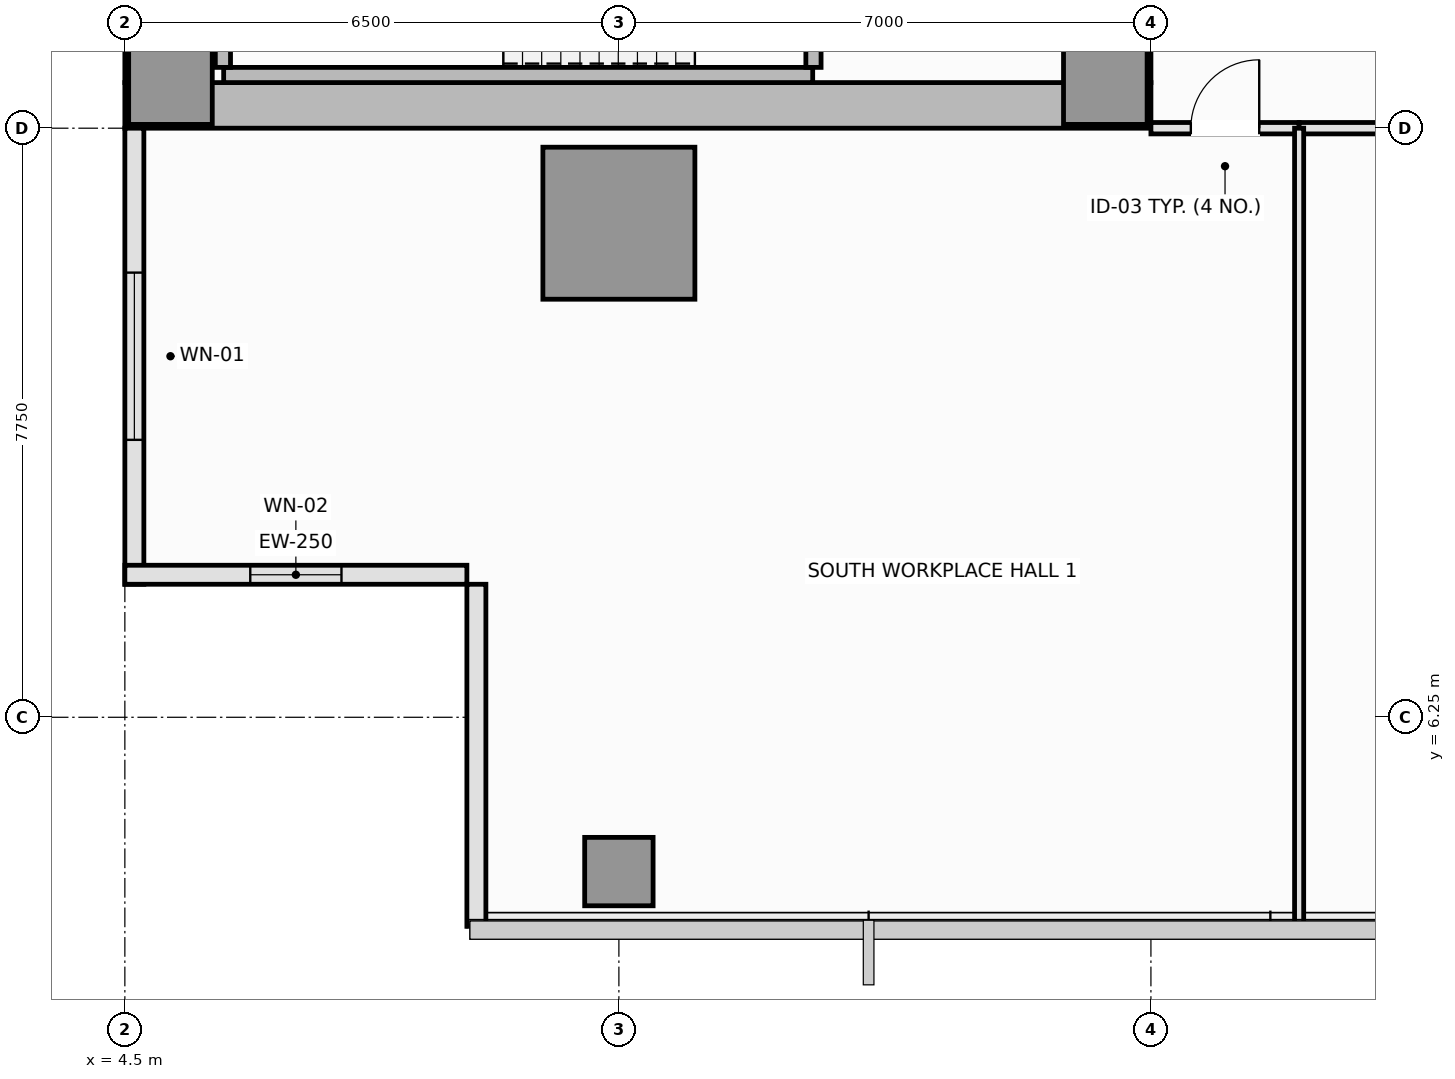
"""IFC4 building model, lengths in metres.
Left out: names, types, materials, properties, quantities, classifications, styles, units other than length and angle.
Written with IfcOpenShell. Run it as: python <this file> out.ifc"""

import sys

from ifc_helpers import new_model, si_unit, direction, frame, frame_2d, origin, origin_2d, place, context, subcontext, project, spatial, rectangle, extrude, element, fill, save


model = new_model("IFC4")
c1 = context("Model", 3, precision=1e-05, world=origin(), true_north=direction((0.0, 1.0)))
c2 = subcontext(c1, "Body", "Model", "MODEL_VIEW")
j1 = project(units=[si_unit("LENGTHUNIT", "METRE"), si_unit("PLANEANGLEUNIT", "RADIAN")], contexts=[c1])
p1 = place(None, origin())
s1 = spatial("IfcSite", under=j1, at=p1, CompositionType="ELEMENT")
p2 = place(p1, origin())
s2 = spatial("IfcBuilding", under=s1, at=p2, CompositionType="ELEMENT")
p3 = place(p2, frame((0.0, 0.0, 148.4)))
s3 = spatial("IfcBuildingStorey", under=s2, at=p3, CompositionType="ELEMENT", Elevation=148.4)
p4 = place(p3, frame((4.5, 14.3, 0.0), z_axis=(0.0, 0.0, 1.0), x_axis=(1.0, 0.0, 0.0)))
e1 = element("IfcWall", 1, at=p4, inside=s3, PredefinedType="SHEAR", context=c2, shape_type="SweptSolid", body=[
    extrude(rectangle(XDim=13.5, YDim=0.6, at=frame_2d((6.75, 0.0))), origin(), (0.0, 0.0, 1.0), 3.55),
])
p5 = place(p3, frame((4.8, 14.6, 0.0), z_axis=(0.0, 0.0, 1.0), x_axis=(0.0, 1.0, 0.0)))
e2 = element("IfcWall", 2, at=p5, inside=s3, PredefinedType="SHEAR", context=c2, shape_type="SweptSolid", body=[
    extrude(rectangle(XDim=21.3, YDim=0.6, at=frame_2d((10.65, 0.0))), origin(), (0.0, 0.0, 1.0), 3.55),
])
p6 = place(p3, frame((17.7, 14.6, 0.0), z_axis=(0.0, 0.0, 1.0), x_axis=(0.0, 1.0, 0.0)))
e3 = element("IfcWall", 3, at=p6, inside=s3, PredefinedType="SHEAR", context=c2, shape_type="SweptSolid", body=[
    extrude(rectangle(XDim=8.85, YDim=0.6, at=frame_2d((4.425, 0.0))), origin(), (0.0, 0.0, 1.0), 3.55),
])
p7 = place(p6, frame((4.3, 0.0, 0.0)))
e4 = element("IfcOpeningElement", 4, at=p7, cuts=e3, PredefinedType="OPENING", context=c2, shape_type="SweptSolid", body=[
    extrude(rectangle(XDim=1.1, YDim=2.15, at=frame_2d((0.55, 1.075))), frame((0.0, 0.31, 0.0), z_axis=(0.0, -1.0, 0.0), x_axis=(1.0, 0.0, 0.0)), (0.0, 0.0, 1.0), 0.62),
])
for number, where, z_axis, x_axis in (
    (5, (5.1, 14.6, 0.0), (0.0, 0.0, 1.0), (1.0, 0.0, 0.0)),
    (6, (17.4, 14.6, 0.0), (0.0, 0.0, 1.0), (1.0, 0.0, 0.0)),
):
    element("IfcColumn", number, at=place(p3, frame(where, z_axis=z_axis, x_axis=x_axis)), inside=s3, PredefinedType="PILASTER", context=c2, shape_type="SweptSolid", body=[
        extrude(rectangle(XDim=1.1, YDim=1.1, at=origin_2d()), origin(), (0.0, 0.0, 1.0), 3.55),
    ])
p8 = place(p3, frame((11.0, 12.75, 0.0), z_axis=(0.0, 0.0, 1.0), x_axis=(1.0, 0.0, 0.0)))
e7 = element("IfcColumn", 7, at=p8, inside=s3, PredefinedType="COLUMN", context=c2, shape_type="SweptSolid", body=[
    extrude(rectangle(XDim=2.0, YDim=2.0, at=origin_2d()), origin(), (0.0, 0.0, 1.0), 3.55),
])
p9 = place(p3, frame((11.0, 4.22, 0.0), z_axis=(0.0, 0.0, 1.0), x_axis=(1.0, 0.0, 0.0)))
e8 = element("IfcColumn", 8, at=p9, inside=s3, PredefinedType="COLUMN", context=c2, shape_type="SweptSolid", body=[
    extrude(rectangle(XDim=0.9, YDim=0.9, at=origin_2d()), origin(), (0.0, 0.0, 1.0), 3.55),
])
p10 = place(p3, frame((4.625, 14.0, 0.0), z_axis=(0.0, 0.0, 1.0), x_axis=(0.0, -1.0, 0.0)))
e9 = element("IfcWall", 9, at=p10, inside=s3, PredefinedType="SOLIDWALL", context=c2, shape_type="SweptSolid", body=[
    extrude(rectangle(XDim=6.0, YDim=0.25, at=frame_2d((3.0, 0.0))), origin(), (0.0, 0.0, 1.0), 3.37),
])
p11 = place(p10, frame((1.9, 0.0, 0.9)))
e10 = element("IfcOpeningElement", 10, at=p11, cuts=e9, PredefinedType="OPENING", context=c2, shape_type="SweptSolid", body=[
    extrude(rectangle(XDim=2.2, YDim=1.8, at=frame_2d((1.1, 0.9))), frame((0.0, 0.135, 0.0), z_axis=(0.0, -1.0, 0.0), x_axis=(1.0, 0.0, 0.0)), (0.0, 0.0, 1.0), 0.27),
])
p12 = place(p3, frame((4.5, 8.125, 0.0), z_axis=(0.0, 0.0, 1.0), x_axis=(1.0, 0.0, 0.0)))
e11 = element("IfcWall", 11, at=p12, inside=s3, PredefinedType="SOLIDWALL", context=c2, shape_type="SweptSolid", body=[
    extrude(rectangle(XDim=4.5, YDim=0.25, at=frame_2d((2.25, 0.0))), origin(), (0.0, 0.0, 1.0), 3.37),
])
p13 = place(p12, frame((1.65, 0.0, 0.9)))
e12 = element("IfcOpeningElement", 12, at=p13, cuts=e11, PredefinedType="OPENING", context=c2, shape_type="SweptSolid", body=[
    extrude(rectangle(XDim=1.2, YDim=1.8, at=frame_2d((0.6, 0.9))), frame((0.0, 0.135, 0.0), z_axis=(0.0, -1.0, 0.0), x_axis=(1.0, 0.0, 0.0)), (0.0, 0.0, 1.0), 0.27),
])
p14 = place(p3, frame((9.125, 8.0, 0.0), z_axis=(0.0, 0.0, 1.0), x_axis=(0.0, -1.0, 0.0)))
e13 = element("IfcWall", 13, at=p14, inside=s3, PredefinedType="SOLIDWALL", context=c2, shape_type="SweptSolid", body=[
    extrude(rectangle(XDim=4.5, YDim=0.25, at=frame_2d((2.25, 0.0))), origin(), (0.0, 0.0, 1.0), 3.37),
])
p15 = place(p3, frame((5.8, 14.7, 0.0), z_axis=(0.0, 0.0, 1.0), x_axis=(1.0, 0.0, 0.0)))
e14 = element("IfcWall", 14, at=p15, inside=s3, PredefinedType="SOLIDWALL", context=c2, shape_type="SweptSolid", body=[
    extrude(rectangle(XDim=7.75, YDim=0.2, at=frame_2d((3.875, 0.0))), origin(), (0.0, 0.0, 1.0), 3.55),
])
p16 = place(p3, frame((5.79, 14.8, 0.0), z_axis=(0.0, 0.0, 1.0), x_axis=(0.0, 1.0, 0.0)))
e15 = element("IfcWall", 15, at=p16, inside=s3, PredefinedType="SOLIDWALL", context=c2, shape_type="SweptSolid", body=[
    extrude(rectangle(XDim=3.05, YDim=0.2, at=frame_2d((1.525, 0.0))), origin(), (0.0, 0.0, 1.0), 3.55),
])
p17 = place(p3, frame((13.56, 14.8, 0.0), z_axis=(0.0, 0.0, 1.0), x_axis=(0.0, 1.0, 0.0)))
e16 = element("IfcWall", 16, at=p17, inside=s3, PredefinedType="SOLIDWALL", context=c2, shape_type="SweptSolid", body=[
    extrude(rectangle(XDim=3.05, YDim=0.2, at=frame_2d((1.525, 0.0))), origin(), (0.0, 0.0, 1.0), 3.55),
])
p18 = place(p17, frame((0.95, 0.0, 0.0)))
e17 = element("IfcOpeningElement", 17, at=p18, cuts=e16, PredefinedType="OPENING", context=c2, shape_type="SweptSolid", body=[
    extrude(rectangle(XDim=1.15, YDim=2.15, at=frame_2d((0.575, 1.075))), frame((0.0, 0.11, 0.0), z_axis=(0.0, -1.0, 0.0), x_axis=(1.0, 0.0, 0.0)), (0.0, 0.0, 1.0), 0.22),
])
p19 = place(p3, frame((18.0, 14.0, 0.0), z_axis=(0.0, 0.0, 1.0), x_axis=(1.0, 0.0, 0.0)))
e18 = element("IfcWall", 18, at=p19, inside=s3, PredefinedType="PARTITIONING", context=c2, shape_type="SweptSolid", body=[
    extrude(rectangle(XDim=1.95, YDim=0.15, at=frame_2d((0.975, 0.0))), origin(), (0.0, 0.0, 1.0), 3.37),
])
p20 = place(p19, frame((0.525, 0.0, 0.0)))
e19 = element("IfcOpeningElement", 19, at=p20, cuts=e18, PredefinedType="OPENING", context=c2, shape_type="SweptSolid", body=[
    extrude(rectangle(XDim=0.9, YDim=2.1, at=frame_2d((0.45, 1.05))), frame((0.0, 0.085, 0.0), z_axis=(0.0, -1.0, 0.0), x_axis=(1.0, 0.0, 0.0)), (0.0, 0.0, 1.0), 0.17),
])
p21 = place(p3, frame((19.95, 14.0, 0.0), z_axis=(0.0, 0.0, 1.0), x_axis=(1.0, 0.0, 0.0)))
e20 = element("IfcWall", 20, at=p21, inside=s3, PredefinedType="PARTITIONING", context=c2, shape_type="SweptSolid", body=[
    extrude(rectangle(XDim=7.55, YDim=0.15, at=frame_2d((3.775, 0.0))), origin(), (0.0, 0.0, 1.0), 3.37),
])
p22 = place(p21, frame((3.275, 0.0, 0.0)))
e21 = element("IfcOpeningElement", 21, at=p22, cuts=e20, PredefinedType="OPENING", context=c2, shape_type="SweptSolid", body=[
    extrude(rectangle(XDim=1.0, YDim=2.15, at=frame_2d((0.5, 1.075))), frame((0.0, 0.085, 0.0), z_axis=(0.0, -1.0, 0.0), x_axis=(1.0, 0.0, 0.0)), (0.0, 0.0, 1.0), 0.17),
])
p23 = place(p3, frame((19.95, 3.51, 0.0), z_axis=(0.0, 0.0, 1.0), x_axis=(0.0, 1.0, 0.0)))
e22 = element("IfcWall", 22, at=p23, inside=s3, PredefinedType="PARTITIONING", context=c2, shape_type="SweptSolid", body=[
    extrude(rectangle(XDim=10.49, YDim=0.12, at=frame_2d((5.245, 0.0))), origin(), (0.0, 0.0, 1.0), 3.37),
])
p24 = place(p11, origin())
e23 = element("IfcWindow", 23, at=p24, inside=s3, PartitioningType="SINGLE_PANEL", PredefinedType="WINDOW", context=c2, shape_type="SweptSolid", body=[
    extrude(rectangle(XDim=2.2, YDim=1.8, at=frame_2d((1.1, 0.9))), frame((0.0, 0.03, 0.0), z_axis=(0.0, -1.0, 0.0), x_axis=(1.0, 0.0, 0.0)), (0.0, 0.0, 1.0), 0.06),
])
fill(e10, e23)
p25 = place(p13, origin())
e24 = element("IfcWindow", 24, at=p25, inside=s3, PartitioningType="SINGLE_PANEL", PredefinedType="WINDOW", context=c2, shape_type="SweptSolid", body=[
    extrude(rectangle(XDim=1.2, YDim=1.8, at=frame_2d((0.6, 0.9))), frame((0.0, 0.03, 0.0), z_axis=(0.0, -1.0, 0.0), x_axis=(1.0, 0.0, 0.0)), (0.0, 0.0, 1.0), 0.06),
])
fill(e12, e24)
p26 = place(p20, origin())
e25 = element("IfcDoor", 25, at=p26, inside=s3, OperationType="SINGLE_SWING_RIGHT", PredefinedType="DOOR", context=c2, shape_type="SweptSolid", body=[
    extrude(rectangle(XDim=0.9, YDim=2.1, at=frame_2d((0.45, 1.05))), frame((0.0, 0.025, 0.0), z_axis=(0.0, -1.0, 0.0), x_axis=(1.0, 0.0, 0.0)), (0.0, 0.0, 1.0), 0.05),
])
fill(e19, e25)
save(model, sys.argv[1])
